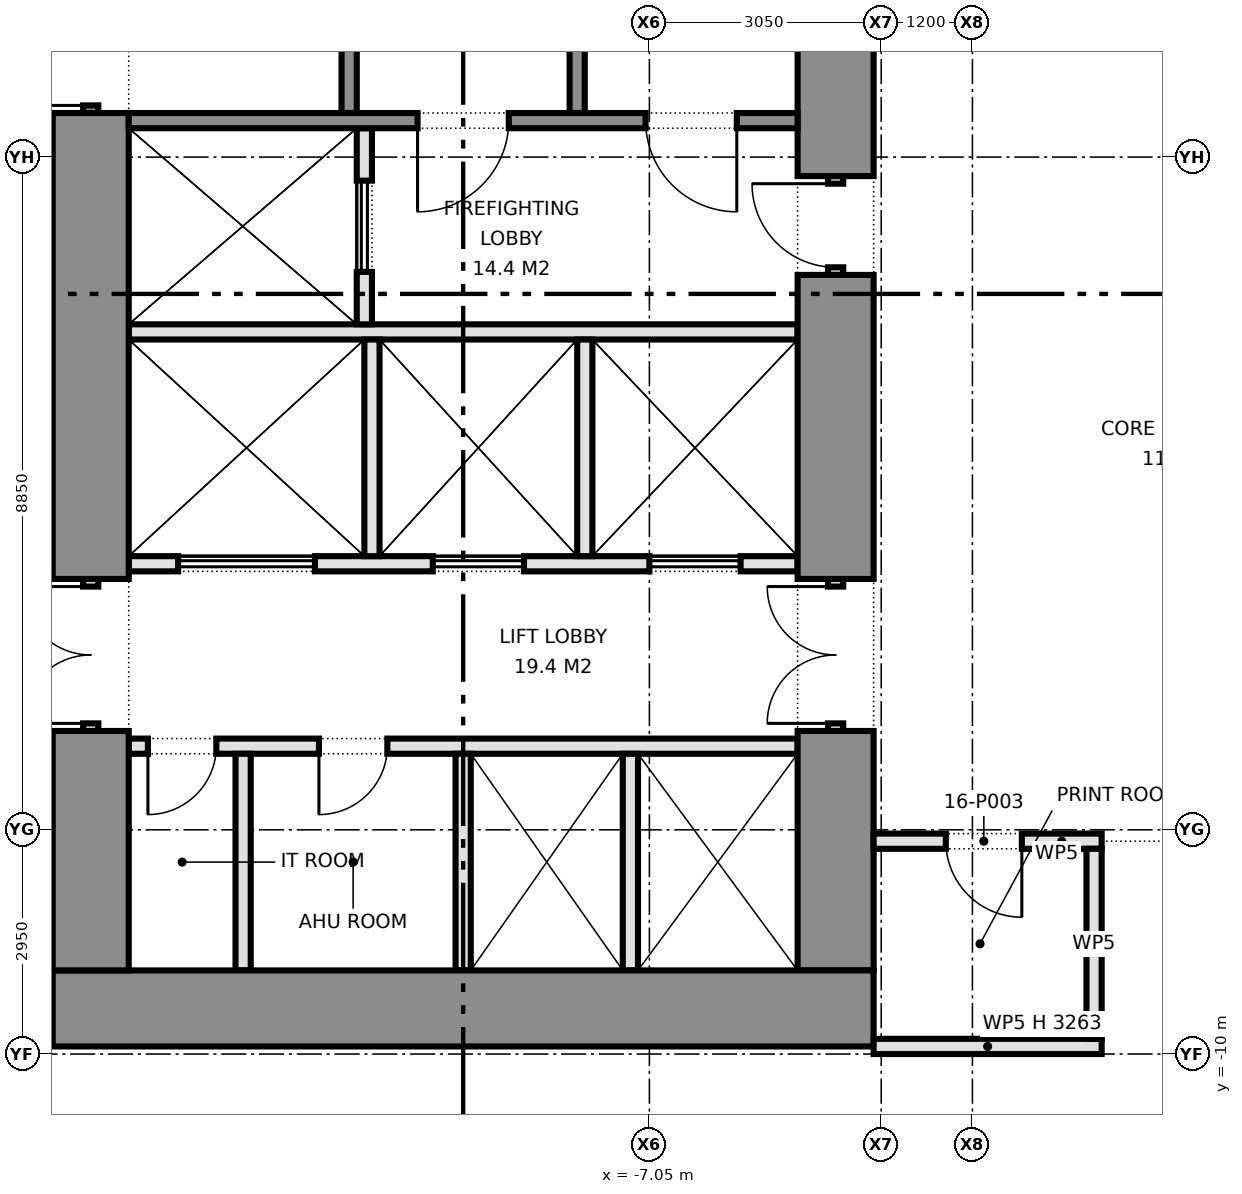
"""IFC4 building model, lengths in metres.
Left out: names, types, materials, properties, quantities, classifications, styles, units other than length and angle.
Written with IfcOpenShell. Run it as: python <this file> out.ifc"""

import sys

from ifc_helpers import new_model, si_unit, direction, frame, frame_2d, origin, place, context, subcontext, project, spatial, rectangle, extrude, element, fill, save


model = new_model("IFC4")
c1 = context("Model", 3, precision=1e-05, world=origin(), true_north=direction((0.0, 1.0)))
c2 = subcontext(c1, "Body", "Model", "MODEL_VIEW")
j1 = project(units=[si_unit("LENGTHUNIT", "METRE"), si_unit("PLANEANGLEUNIT", "RADIAN")], contexts=[c1])
p1 = place(None, origin())
s1 = spatial("IfcSite", under=j1, at=p1, CompositionType="ELEMENT")
p2 = place(p1, origin())
s2 = spatial("IfcBuilding", under=s1, at=p2, CompositionType="ELEMENT")
p3 = place(p2, frame((0.0, 0.0, 73.2)))
s3 = spatial("IfcBuildingStorey", under=s2, at=p3, CompositionType="ELEMENT", Elevation=73.2)
p4 = place(p3, frame((-14.9, -9.4, 0.0), z_axis=(0.0, 0.0, 1.0), x_axis=(1.0, 0.0, 0.0)))
e1 = element("IfcWall", 1, at=p4, inside=s3, PredefinedType="SHEAR", context=c2, shape_type="SweptSolid", body=[
    extrude(rectangle(XDim=10.8, YDim=1.0, at=frame_2d((5.4, 0.0))), origin(), (0.0, 0.0, 1.0), 4.2),
])
p5 = place(p3, frame((-14.4, -8.9, 0.0), z_axis=(0.0, 0.0, 1.0), x_axis=(0.0, 1.0, 0.0)))
e2 = element("IfcWall", 2, at=p5, inside=s3, PredefinedType="SHEAR", context=c2, shape_type="SweptSolid", body=[
    extrude(rectangle(XDim=3.15, YDim=1.0, at=frame_2d((1.575, 0.0))), origin(), (0.0, 0.0, 1.0), 4.2),
])
p6 = place(p3, frame((-14.4, -5.75, 0.0), z_axis=(0.0, 0.0, 1.0), x_axis=(0.0, 1.0, 0.0)))
e3 = element("IfcWall", 3, at=p6, inside=s3, PredefinedType="PARTITIONING", context=c2, shape_type="SweptSolid", body=[
    extrude(rectangle(XDim=2.0, YDim=0.2, at=frame_2d((1.0, 0.0))), origin(), (0.0, 0.0, 1.0), 2.4),
])
p7 = place(p6, frame((0.1, 0.0, 0.0)))
e4 = element("IfcOpeningElement", 4, at=p7, cuts=e3, PredefinedType="OPENING", context=c2, shape_type="SweptSolid", body=[
    extrude(rectangle(XDim=1.8, YDim=2.1, at=frame_2d((0.9, 1.05))), frame((0.0, 0.11, 0.0), z_axis=(0.0, -1.0, 0.0), x_axis=(1.0, 0.0, 0.0)), (0.0, 0.0, 1.0), 0.22),
])
p8 = place(p3, frame((-14.4, -3.75, 0.0), z_axis=(0.0, 0.0, 1.0), x_axis=(0.0, 1.0, 0.0)))
e5 = element("IfcWall", 5, at=p8, inside=s3, PredefinedType="SHEAR", context=c2, shape_type="SweptSolid", body=[
    extrude(rectangle(XDim=6.13, YDim=1.0, at=frame_2d((3.065, 0.0))), origin(), (0.0, 0.0, 1.0), 4.2),
])
p9 = place(p3, frame((-14.4, 2.38, 0.0), z_axis=(0.0, 0.0, 1.0), x_axis=(0.0, 1.0, 0.0)))
e6 = element("IfcWall", 6, at=p9, inside=s3, PredefinedType="SHEAR", context=c2, shape_type="SweptSolid", body=[
    extrude(rectangle(XDim=1.3, YDim=0.2, at=frame_2d((0.65, 0.0))), origin(), (0.0, 0.0, 1.0), 2.4),
])
p10 = place(p9, frame((0.1, 0.0, 0.0)))
e7 = element("IfcOpeningElement", 7, at=p10, cuts=e6, PredefinedType="OPENING", context=c2, shape_type="SweptSolid", body=[
    extrude(rectangle(XDim=1.1, YDim=2.1, at=frame_2d((0.55, 1.05))), frame((0.0, 0.11, 0.0), z_axis=(0.0, -1.0, 0.0), x_axis=(1.0, 0.0, 0.0)), (0.0, 0.0, 1.0), 0.22),
])
p11 = place(p3, frame((-4.6, -8.9, 0.0), z_axis=(0.0, 0.0, 1.0), x_axis=(0.0, 1.0, 0.0)))
e8 = element("IfcWall", 8, at=p11, inside=s3, PredefinedType="SHEAR", context=c2, shape_type="SweptSolid", body=[
    extrude(rectangle(XDim=3.15, YDim=1.0, at=frame_2d((1.575, 0.0))), origin(), (0.0, 0.0, 1.0), 4.2),
])
p12 = place(p3, frame((-4.6, -5.75, 0.0), z_axis=(0.0, 0.0, 1.0), x_axis=(0.0, 1.0, 0.0)))
e9 = element("IfcWall", 9, at=p12, inside=s3, PredefinedType="PARTITIONING", context=c2, shape_type="SweptSolid", body=[
    extrude(rectangle(XDim=2.0, YDim=0.2, at=frame_2d((1.0, 0.0))), origin(), (0.0, 0.0, 1.0), 2.4),
])
p13 = place(p12, frame((0.1, 0.0, 0.0)))
e10 = element("IfcOpeningElement", 10, at=p13, cuts=e9, PredefinedType="OPENING", context=c2, shape_type="SweptSolid", body=[
    extrude(rectangle(XDim=1.8, YDim=2.1, at=frame_2d((0.9, 1.05))), frame((0.0, 0.11, 0.0), z_axis=(0.0, -1.0, 0.0), x_axis=(1.0, 0.0, 0.0)), (0.0, 0.0, 1.0), 0.22),
])
p14 = place(p3, frame((-4.6, -3.75, 0.0), z_axis=(0.0, 0.0, 1.0), x_axis=(0.0, 1.0, 0.0)))
e11 = element("IfcWall", 11, at=p14, inside=s3, PredefinedType="SHEAR", context=c2, shape_type="SweptSolid", body=[
    extrude(rectangle(XDim=4.0, YDim=1.0, at=frame_2d((2.0, 0.0))), origin(), (0.0, 0.0, 1.0), 4.2),
])
p15 = place(p3, frame((-4.6, 0.25, 0.0), z_axis=(0.0, 0.0, 1.0), x_axis=(0.0, 1.0, 0.0)))
e12 = element("IfcWall", 12, at=p15, inside=s3, PredefinedType="PARTITIONING", context=c2, shape_type="SweptSolid", body=[
    extrude(rectangle(XDim=1.3, YDim=0.2, at=frame_2d((0.65, 0.0))), origin(), (0.0, 0.0, 1.0), 2.4),
])
p16 = place(p15, frame((0.1, 0.0, 0.0)))
e13 = element("IfcOpeningElement", 13, at=p16, cuts=e12, PredefinedType="OPENING", context=c2, shape_type="SweptSolid", body=[
    extrude(rectangle(XDim=1.1, YDim=2.1, at=frame_2d((0.55, 1.05))), frame((0.0, 0.11, 0.0), z_axis=(0.0, -1.0, 0.0), x_axis=(1.0, 0.0, 0.0)), (0.0, 0.0, 1.0), 0.22),
])
p17 = place(p3, frame((-4.6, 1.55, 0.0), z_axis=(0.0, 0.0, 1.0), x_axis=(0.0, 1.0, 0.0)))
e14 = element("IfcWall", 14, at=p17, inside=s3, PredefinedType="SHEAR", context=c2, shape_type="SweptSolid", body=[
    extrude(rectangle(XDim=7.35, YDim=1.0, at=frame_2d((3.675, 0.0))), origin(), (0.0, 0.0, 1.0), 4.2),
])
p18 = place(p3, frame((-13.9, -5.95, 0.0), z_axis=(0.0, 0.0, 1.0), x_axis=(1.0, 0.0, 0.0)))
e15 = element("IfcWall", 15, at=p18, inside=s3, PredefinedType="PARTITIONING", context=c2, shape_type="SweptSolid", body=[
    extrude(rectangle(XDim=8.8, YDim=0.2, at=frame_2d((4.4, 0.0))), origin(), (0.0, 0.0, 1.0), 4.2),
])
p19 = place(p18, frame((0.252, 0.0, 0.0)))
e16 = element("IfcOpeningElement", 16, at=p19, cuts=e15, PredefinedType="OPENING", context=c2, shape_type="SweptSolid", body=[
    extrude(rectangle(XDim=0.9, YDim=2.1, at=frame_2d((0.45, 1.05))), frame((0.0, 0.11, 0.0), z_axis=(0.0, -1.0, 0.0), x_axis=(1.0, 0.0, 0.0)), (0.0, 0.0, 1.0), 0.22),
])
p20 = place(p18, frame((2.502, 0.0, 0.0)))
e17 = element("IfcOpeningElement", 17, at=p20, cuts=e15, PredefinedType="OPENING", context=c2, shape_type="SweptSolid", body=[
    extrude(rectangle(XDim=0.9, YDim=2.1, at=frame_2d((0.45, 1.05))), frame((0.0, 0.11, 0.0), z_axis=(0.0, -1.0, 0.0), x_axis=(1.0, 0.0, 0.0)), (0.0, 0.0, 1.0), 0.22),
])
p21 = place(p3, frame((-13.9, -3.55, 0.0), z_axis=(0.0, 0.0, 1.0), x_axis=(1.0, 0.0, 0.0)))
e18 = element("IfcWall", 18, at=p21, inside=s3, PredefinedType="PARTITIONING", context=c2, shape_type="SweptSolid", body=[
    extrude(rectangle(XDim=8.8, YDim=0.2, at=frame_2d((4.4, 0.0))), origin(), (0.0, 0.0, 1.0), 4.2),
])
p22 = place(p21, frame((0.65, 0.0, 0.0)))
e19 = element("IfcOpeningElement", 19, at=p22, cuts=e18, PredefinedType="OPENING", context=c2, shape_type="SweptSolid", body=[
    extrude(rectangle(XDim=1.8, YDim=2.1, at=frame_2d((0.9, 1.05))), frame((0.0, 0.11, 0.0), z_axis=(0.0, -1.0, 0.0), x_axis=(1.0, 0.0, 0.0)), (0.0, 0.0, 1.0), 0.22),
])
p23 = place(p21, frame((4.0, 0.0, 0.0)))
e20 = element("IfcOpeningElement", 20, at=p23, cuts=e18, PredefinedType="OPENING", context=c2, shape_type="SweptSolid", body=[
    extrude(rectangle(XDim=1.2, YDim=2.1, at=frame_2d((0.6, 1.05))), frame((0.0, 0.11, 0.0), z_axis=(0.0, -1.0, 0.0), x_axis=(1.0, 0.0, 0.0)), (0.0, 0.0, 1.0), 0.22),
])
p24 = place(p21, frame((6.85, 0.0, 0.0)))
e21 = element("IfcOpeningElement", 21, at=p24, cuts=e18, PredefinedType="OPENING", context=c2, shape_type="SweptSolid", body=[
    extrude(rectangle(XDim=1.2, YDim=2.1, at=frame_2d((0.6, 1.05))), frame((0.0, 0.11, 0.0), z_axis=(0.0, -1.0, 0.0), x_axis=(1.0, 0.0, 0.0)), (0.0, 0.0, 1.0), 0.22),
])
p25 = place(p3, frame((-13.9, -0.5, 0.0), z_axis=(0.0, 0.0, 1.0), x_axis=(1.0, 0.0, 0.0)))
e22 = element("IfcWall", 22, at=p25, inside=s3, PredefinedType="PARTITIONING", context=c2, shape_type="SweptSolid", body=[
    extrude(rectangle(XDim=8.8, YDim=0.2, at=frame_2d((4.4, 0.0))), origin(), (0.0, 0.0, 1.0), 4.2),
])
p26 = place(p3, frame((-10.8, -0.4, 0.0), z_axis=(0.0, 0.0, 1.0), x_axis=(0.0, 1.0, 0.0)))
e23 = element("IfcWall", 23, at=p26, inside=s3, PredefinedType="PARTITIONING", context=c2, shape_type="SweptSolid", body=[
    extrude(rectangle(XDim=2.58, YDim=0.2, at=frame_2d((1.29, 0.0))), origin(), (0.0, 0.0, 1.0), 4.2),
])
p27 = place(p26, frame((0.69, 0.0, 0.0)))
e24 = element("IfcOpeningElement", 24, at=p27, cuts=e23, PredefinedType="OPENING", context=c2, shape_type="SweptSolid", body=[
    extrude(rectangle(XDim=1.2, YDim=2.1, at=frame_2d((0.6, 1.05))), frame((0.0, 0.11, 0.0), z_axis=(0.0, -1.0, 0.0), x_axis=(1.0, 0.0, 0.0)), (0.0, 0.0, 1.0), 0.22),
])
p28 = place(p3, frame((-13.9, 2.28, 0.0), z_axis=(0.0, 0.0, 1.0), x_axis=(1.0, 0.0, 0.0)))
e25 = element("IfcWall", 25, at=p28, inside=s3, PredefinedType="SHEAR", context=c2, shape_type="SweptSolid", body=[
    extrude(rectangle(XDim=8.8, YDim=0.2, at=frame_2d((4.4, 0.0))), origin(), (0.0, 0.0, 1.0), 4.2),
])
p29 = place(p28, frame((3.8, 0.0, 0.0)))
e26 = element("IfcOpeningElement", 26, at=p29, cuts=e25, PredefinedType="OPENING", context=c2, shape_type="SweptSolid", body=[
    extrude(rectangle(XDim=1.2, YDim=2.1, at=frame_2d((0.6, 1.05))), frame((0.0, 0.11, 0.0), z_axis=(0.0, -1.0, 0.0), x_axis=(1.0, 0.0, 0.0)), (0.0, 0.0, 1.0), 0.22),
])
p30 = place(p28, frame((6.8, 0.0, 0.0)))
e27 = element("IfcOpeningElement", 27, at=p30, cuts=e25, PredefinedType="OPENING", context=c2, shape_type="SweptSolid", body=[
    extrude(rectangle(XDim=1.2, YDim=2.1, at=frame_2d((0.6, 1.05))), frame((0.0, 0.11, 0.0), z_axis=(0.0, -1.0, 0.0), x_axis=(1.0, 0.0, 0.0)), (0.0, 0.0, 1.0), 0.22),
])
for number, where, z_axis, x_axis in (
    (28, (-11.0, 2.38, 0.0), (0.0, 0.0, 1.0), (0.0, 1.0, 0.0)),
    (29, (-8.0, 2.38, 0.0), (0.0, 0.0, 1.0), (0.0, 1.0, 0.0)),
):
    element("IfcWall", number, at=place(p3, frame(where, z_axis=z_axis, x_axis=x_axis)), inside=s3, PredefinedType="SHEAR", context=c2, shape_type="SweptSolid", body=[
        extrude(rectangle(XDim=6.52, YDim=0.2, at=frame_2d((3.26, 0.0))), origin(), (0.0, 0.0, 1.0), 4.2),
    ])
for number, where, z_axis, x_axis in (
    (30, (-9.5, -8.9, 0.0), (0.0, 0.0, 1.0), (0.0, 1.0, 0.0)),
    (31, (-7.3, -8.9, 0.0), (0.0, 0.0, 1.0), (0.0, 1.0, 0.0)),
    (32, (-12.395, -8.9, 0.0), (0.0, 0.0, 1.0), (0.0, 1.0, 0.0)),
    (33, (-10.7, -3.45, 0.0), (0.0, 0.0, 1.0), (0.0, 1.0, 0.0)),
    (34, (-7.9, -3.45, 0.0), (0.0, 0.0, 1.0), (0.0, 1.0, 0.0)),
):
    element("IfcWall", number, at=place(p3, frame(where, z_axis=z_axis, x_axis=x_axis)), inside=s3, PredefinedType="PARTITIONING", context=c2, shape_type="SweptSolid", body=[
        extrude(rectangle(XDim=2.85, YDim=0.2, at=frame_2d((1.425, 0.0))), origin(), (0.0, 0.0, 1.0), 4.2),
    ])
p31 = place(p3, frame((-4.1, -9.9, 0.0), z_axis=(0.0, 0.0, 1.0), x_axis=(1.0, 0.0, 0.0)))
e35 = element("IfcWall", 35, at=p31, inside=s3, PredefinedType="PARTITIONING", context=c2, shape_type="SweptSolid", body=[
    extrude(rectangle(XDim=3.0, YDim=0.2, at=frame_2d((1.5, 0.0))), origin(), (0.0, 0.0, 1.0), 3.263),
])
p32 = place(p3, frame((-4.1, -7.2, 0.0), z_axis=(0.0, 0.0, 1.0), x_axis=(1.0, 0.0, 0.0)))
e36 = element("IfcWall", 36, at=p32, inside=s3, PredefinedType="PARTITIONING", context=c2, shape_type="SweptSolid", body=[
    extrude(rectangle(XDim=3.0, YDim=0.2, at=frame_2d((1.5, 0.0))), origin(), (0.0, 0.0, 1.0), 4.2),
])
p33 = place(p32, frame((0.95, 0.0, 0.0)))
e37 = element("IfcOpeningElement", 37, at=p33, cuts=e36, PredefinedType="OPENING", context=c2, shape_type="SweptSolid", body=[
    extrude(rectangle(XDim=1.0, YDim=2.1, at=frame_2d((0.5, 1.05))), frame((0.0, 0.11, 0.0), z_axis=(0.0, -1.0, 0.0), x_axis=(1.0, 0.0, 0.0)), (0.0, 0.0, 1.0), 0.22),
])
p34 = place(p3, frame((-1.2, -9.8, 0.0), z_axis=(0.0, 0.0, 1.0), x_axis=(0.0, 1.0, 0.0)))
e38 = element("IfcWall", 38, at=p34, inside=s3, PredefinedType="PARTITIONING", context=c2, shape_type="SweptSolid", body=[
    extrude(rectangle(XDim=2.5, YDim=0.2, at=frame_2d((1.25, 0.0))), origin(), (0.0, 0.0, 1.0), 4.2),
])
p35 = place(p7, origin())
e39 = element("IfcDoor", 39, at=p35, inside=s3, OperationType="DOUBLE_DOOR_SINGLE_SWING", PredefinedType="DOOR", context=c2, shape_type="SweptSolid", body=[
    extrude(rectangle(XDim=1.8, YDim=2.1, at=frame_2d((0.9, 1.05))), frame((0.0, 0.025, 0.0), z_axis=(0.0, -1.0, 0.0), x_axis=(1.0, 0.0, 0.0)), (0.0, 0.0, 1.0), 0.05),
])
fill(e4, e39)
p36 = place(p10, origin())
e40 = element("IfcDoor", 40, at=p36, inside=s3, OperationType="SINGLE_SWING_LEFT", PredefinedType="DOOR", context=c2, shape_type="SweptSolid", body=[
    extrude(rectangle(XDim=1.1, YDim=2.1, at=frame_2d((0.55, 1.05))), frame((0.0, 0.025, 0.0), z_axis=(0.0, -1.0, 0.0), x_axis=(1.0, 0.0, 0.0)), (0.0, 0.0, 1.0), 0.05),
])
fill(e7, e40)
p37 = place(p13, origin())
e41 = element("IfcDoor", 41, at=p37, inside=s3, OperationType="DOUBLE_DOOR_SINGLE_SWING", PredefinedType="DOOR", context=c2, shape_type="SweptSolid", body=[
    extrude(rectangle(XDim=1.8, YDim=2.1, at=frame_2d((0.9, 1.05))), frame((0.0, 0.025, 0.0), z_axis=(0.0, -1.0, 0.0), x_axis=(1.0, 0.0, 0.0)), (0.0, 0.0, 1.0), 0.05),
])
fill(e10, e41)
p38 = place(p16, origin())
e42 = element("IfcDoor", 42, at=p38, inside=s3, OperationType="SINGLE_SWING_RIGHT", PredefinedType="DOOR", context=c2, shape_type="SweptSolid", body=[
    extrude(rectangle(XDim=1.1, YDim=2.1, at=frame_2d((0.55, 1.05))), frame((0.0, 0.025, 0.0), z_axis=(0.0, -1.0, 0.0), x_axis=(1.0, 0.0, 0.0)), (0.0, 0.0, 1.0), 0.05),
])
fill(e13, e42)
p39 = place(p22, origin())
e43 = element("IfcDoor", 43, at=p39, inside=s3, OperationType="DOUBLE_DOOR_SLIDING", PredefinedType="DOOR", context=c2, shape_type="SweptSolid", body=[
    extrude(rectangle(XDim=1.8, YDim=2.1, at=frame_2d((0.9, 1.05))), frame((0.0, 0.025, 0.0), z_axis=(0.0, -1.0, 0.0), x_axis=(1.0, 0.0, 0.0)), (0.0, 0.0, 1.0), 0.05),
])
fill(e19, e43)
p40 = place(p23, origin())
e44 = element("IfcDoor", 44, at=p40, inside=s3, OperationType="DOUBLE_DOOR_SLIDING", PredefinedType="DOOR", context=c2, shape_type="SweptSolid", body=[
    extrude(rectangle(XDim=1.2, YDim=2.1, at=frame_2d((0.6, 1.05))), frame((0.0, 0.025, 0.0), z_axis=(0.0, -1.0, 0.0), x_axis=(1.0, 0.0, 0.0)), (0.0, 0.0, 1.0), 0.05),
])
fill(e20, e44)
p41 = place(p24, origin())
e45 = element("IfcDoor", 45, at=p41, inside=s3, OperationType="DOUBLE_DOOR_SLIDING", PredefinedType="DOOR", context=c2, shape_type="SweptSolid", body=[
    extrude(rectangle(XDim=1.2, YDim=2.1, at=frame_2d((0.6, 1.05))), frame((0.0, 0.025, 0.0), z_axis=(0.0, -1.0, 0.0), x_axis=(1.0, 0.0, 0.0)), (0.0, 0.0, 1.0), 0.05),
])
fill(e21, e45)
p42 = place(p27, origin())
e46 = element("IfcDoor", 46, at=p42, inside=s3, OperationType="DOUBLE_DOOR_SLIDING", PredefinedType="DOOR", context=c2, shape_type="SweptSolid", body=[
    extrude(rectangle(XDim=1.2, YDim=2.1, at=frame_2d((0.6, 1.05))), frame((0.0, 0.025, 0.0), z_axis=(0.0, -1.0, 0.0), x_axis=(1.0, 0.0, 0.0)), (0.0, 0.0, 1.0), 0.05),
])
fill(e24, e46)
p43 = place(p19, frame((0.9, 0.0, 0.0), z_axis=(0.0, 0.0, 1.0), x_axis=(-1.0, 0.0, 0.0)))
e47 = element("IfcDoor", 47, at=p43, inside=s3, OperationType="SINGLE_SWING_RIGHT", PredefinedType="DOOR", context=c2, shape_type="SweptSolid", body=[
    extrude(rectangle(XDim=0.9, YDim=2.1, at=frame_2d((0.45, 1.05))), frame((0.0, 0.025, 0.0), z_axis=(0.0, -1.0, 0.0), x_axis=(1.0, 0.0, 0.0)), (0.0, 0.0, 1.0), 0.05),
])
fill(e16, e47)
p44 = place(p20, frame((0.9, 0.0, 0.0), z_axis=(0.0, 0.0, 1.0), x_axis=(-1.0, 0.0, 0.0)))
e48 = element("IfcDoor", 48, at=p44, inside=s3, OperationType="SINGLE_SWING_RIGHT", PredefinedType="DOOR", context=c2, shape_type="SweptSolid", body=[
    extrude(rectangle(XDim=0.9, YDim=2.1, at=frame_2d((0.45, 1.05))), frame((0.0, 0.025, 0.0), z_axis=(0.0, -1.0, 0.0), x_axis=(1.0, 0.0, 0.0)), (0.0, 0.0, 1.0), 0.05),
])
fill(e17, e48)
p45 = place(p29, frame((1.2, 0.0, 0.0), z_axis=(0.0, 0.0, 1.0), x_axis=(-1.0, 0.0, 0.0)))
e49 = element("IfcDoor", 49, at=p45, inside=s3, OperationType="SINGLE_SWING_RIGHT", PredefinedType="DOOR", context=c2, shape_type="SweptSolid", body=[
    extrude(rectangle(XDim=1.2, YDim=2.1, at=frame_2d((0.6, 1.05))), frame((0.0, 0.025, 0.0), z_axis=(0.0, -1.0, 0.0), x_axis=(1.0, 0.0, 0.0)), (0.0, 0.0, 1.0), 0.05),
])
fill(e26, e49)
p46 = place(p30, frame((1.2, 0.0, 0.0), z_axis=(0.0, 0.0, 1.0), x_axis=(-1.0, 0.0, 0.0)))
e50 = element("IfcDoor", 50, at=p46, inside=s3, OperationType="SINGLE_SWING_LEFT", PredefinedType="DOOR", context=c2, shape_type="SweptSolid", body=[
    extrude(rectangle(XDim=1.2, YDim=2.1, at=frame_2d((0.6, 1.05))), frame((0.0, 0.025, 0.0), z_axis=(0.0, -1.0, 0.0), x_axis=(1.0, 0.0, 0.0)), (0.0, 0.0, 1.0), 0.05),
])
fill(e27, e50)
p47 = place(p33, frame((1.0, 0.0, 0.0), z_axis=(0.0, 0.0, 1.0), x_axis=(-1.0, 0.0, 0.0)))
e51 = element("IfcDoor", 51, at=p47, inside=s3, OperationType="SINGLE_SWING_LEFT", PredefinedType="DOOR", context=c2, shape_type="SweptSolid", body=[
    extrude(rectangle(XDim=1.0, YDim=2.1, at=frame_2d((0.5, 1.05))), frame((0.0, 0.025, 0.0), z_axis=(0.0, -1.0, 0.0), x_axis=(1.0, 0.0, 0.0)), (0.0, 0.0, 1.0), 0.05),
])
fill(e37, e51)
save(model, sys.argv[1])
